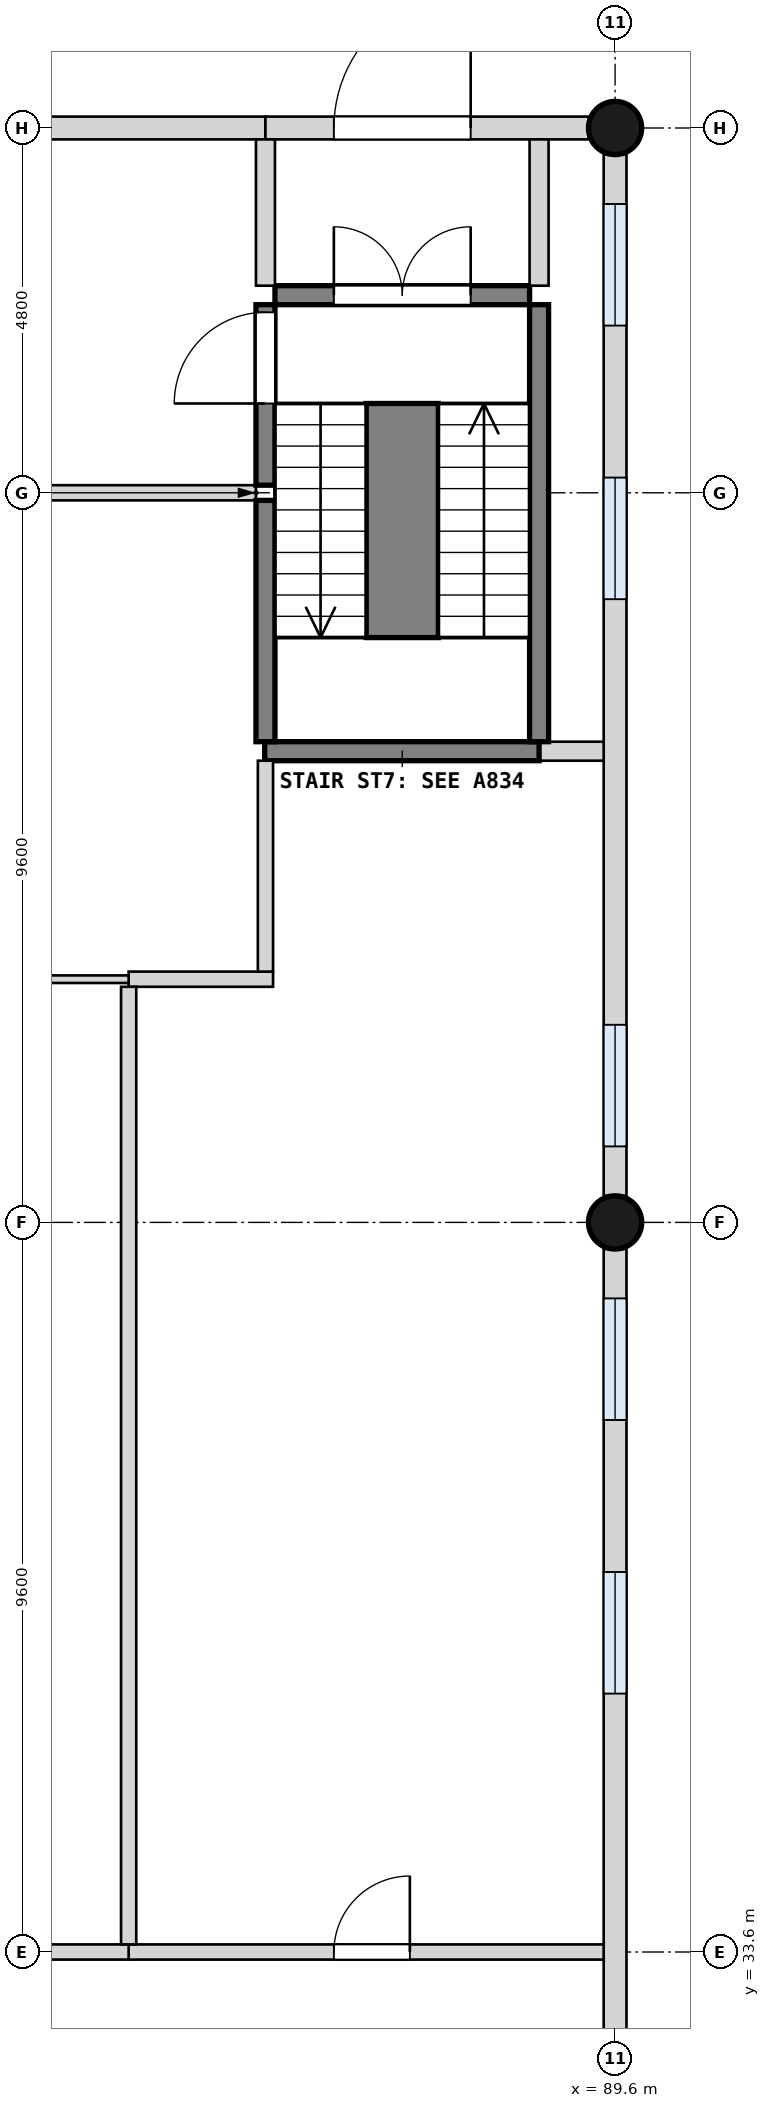
"""IFC4 building model, lengths in metres.
Left out: names, types, materials, properties, quantities, classifications, styles, units other than length and angle.
Written with IfcOpenShell. Run it as: python <this file> out.ifc"""

import sys

from ifc_helpers import new_model, si_unit, direction, frame, frame_2d, origin, origin_2d, place, context, subcontext, project, spatial, rectangle, circle, extrude, element, fill, save


model = new_model("IFC4")
c1 = context("Model", 3, precision=1e-05, world=origin(), true_north=direction((0.0, 1.0)))
c2 = subcontext(c1, "Body", "Model", "MODEL_VIEW")
j1 = project(units=[si_unit("LENGTHUNIT", "METRE"), si_unit("PLANEANGLEUNIT", "RADIAN")], contexts=[c1])
p1 = place(None, origin())
s1 = spatial("IfcSite", under=j1, at=p1, CompositionType="ELEMENT")
p2 = place(p1, origin())
s2 = spatial("IfcBuilding", under=s1, at=p2, CompositionType="ELEMENT")
p3 = place(p2, origin())
s3 = spatial("IfcBuildingStorey", under=s2, at=p3, CompositionType="ELEMENT", Elevation=0.0)
for number, where, z_axis, x_axis in (
    (1, (89.6, 43.2, 0.0), (0.0, 0.0, 1.0), (1.0, 0.0, 0.0)),
    (2, (89.6, 57.6, 0.0), (0.0, 0.0, 1.0), (1.0, 0.0, 0.0)),
):
    element("IfcColumn", number, at=place(p3, frame(where, z_axis=z_axis, x_axis=x_axis)), inside=s3, PredefinedType="COLUMN", context=c2, shape_type="SweptSolid", body=[
        extrude(circle(Radius=0.35, at=origin_2d()), origin(), (0.0, 0.0, 1.0), 4.2),
    ])
p4 = place(p3, frame((77.15, 57.6, 0.0), z_axis=(0.0, 0.0, 1.0), x_axis=(1.0, 0.0, 0.0)))
e3 = element("IfcWall", 3, at=p4, inside=s3, PredefinedType="SOLIDWALL", context=c2, shape_type="SweptSolid", body=[
    extrude(rectangle(XDim=7.85, YDim=0.3, at=frame_2d((3.925, 0.0))), origin(), (0.0, 0.0, 1.0), 3.0),
])
p5 = place(p4, frame((2.15, 0.0, 0.0)))
e4 = element("IfcOpeningElement", 4, at=p5, cuts=e3, PredefinedType="OPENING", context=c2, shape_type="SweptSolid", body=[
    extrude(rectangle(XDim=2.0, YDim=2.1, at=frame_2d((1.0, 1.05))), frame((0.0, 0.16, 0.0), z_axis=(0.0, -1.0, 0.0), x_axis=(1.0, 0.0, 0.0)), (0.0, 0.0, 1.0), 0.32),
])
p6 = place(p3, frame((85.0, 57.6, 0.0), z_axis=(0.0, 0.0, 1.0), x_axis=(1.0, 0.0, 0.0)))
e5 = element("IfcWall", 5, at=p6, inside=s3, PredefinedType="SOLIDWALL", context=c2, shape_type="SweptSolid", body=[
    extrude(rectangle(XDim=4.25, YDim=0.3, at=frame_2d((2.125, 0.0))), origin(), (0.0, 0.0, 1.0), 3.0),
])
p7 = place(p6, frame((0.9, 0.0, 0.0)))
e6 = element("IfcOpeningElement", 6, at=p7, cuts=e5, PredefinedType="OPENING", context=c2, shape_type="SweptSolid", body=[
    extrude(rectangle(XDim=1.8, YDim=2.1, at=frame_2d((0.9, 1.05))), frame((0.0, 0.16, 0.0), z_axis=(0.0, -1.0, 0.0), x_axis=(1.0, 0.0, 0.0)), (0.0, 0.0, 1.0), 0.32),
])
p8 = place(p3, frame((89.6, 29.15, 0.0), z_axis=(0.0, 0.0, 1.0), x_axis=(0.0, 1.0, 0.0)))
e7 = element("IfcWall", 7, at=p8, inside=s3, PredefinedType="SOLIDWALL", context=c2, shape_type="SweptSolid", body=[
    extrude(rectangle(XDim=13.7, YDim=0.3, at=frame_2d((6.85, 0.0))), origin(), (0.0, 0.0, 1.0), 3.0),
])
p9 = place(p8, frame((1.05, 0.0, 0.0)))
e8 = element("IfcOpeningElement", 8, at=p9, cuts=e7, PredefinedType="OPENING", context=c2, shape_type="SweptSolid", body=[
    extrude(rectangle(XDim=2.0, YDim=2.1, at=frame_2d((1.0, 1.05))), frame((0.0, 0.16, 0.0), z_axis=(0.0, -1.0, 0.0), x_axis=(1.0, 0.0, 0.0)), (0.0, 0.0, 1.0), 0.32),
])
p10 = place(p8, frame((7.85, 0.0, 0.3)))
e9 = element("IfcOpeningElement", 9, at=p10, cuts=e7, PredefinedType="OPENING", context=c2, shape_type="SweptSolid", body=[
    extrude(rectangle(XDim=1.6, YDim=2.4, at=frame_2d((0.8, 1.2))), frame((0.0, 0.16, 0.0), z_axis=(0.0, -1.0, 0.0), x_axis=(1.0, 0.0, 0.0)), (0.0, 0.0, 1.0), 0.32),
])
p11 = place(p8, frame((11.45, 0.0, 0.3)))
e10 = element("IfcOpeningElement", 10, at=p11, cuts=e7, PredefinedType="OPENING", context=c2, shape_type="SweptSolid", body=[
    extrude(rectangle(XDim=1.6, YDim=2.4, at=frame_2d((0.8, 1.2))), frame((0.0, 0.16, 0.0), z_axis=(0.0, -1.0, 0.0), x_axis=(1.0, 0.0, 0.0)), (0.0, 0.0, 1.0), 0.32),
])
p12 = place(p3, frame((89.6, 43.55, 0.0), z_axis=(0.0, 0.0, 1.0), x_axis=(0.0, 1.0, 0.0)))
e11 = element("IfcWall", 11, at=p12, inside=s3, PredefinedType="SOLIDWALL", context=c2, shape_type="SweptSolid", body=[
    extrude(rectangle(XDim=13.7, YDim=0.3, at=frame_2d((6.85, 0.0))), origin(), (0.0, 0.0, 1.0), 3.0),
])
p13 = place(p12, frame((0.65, 0.0, 0.3)))
e12 = element("IfcOpeningElement", 12, at=p13, cuts=e11, PredefinedType="OPENING", context=c2, shape_type="SweptSolid", body=[
    extrude(rectangle(XDim=1.6, YDim=2.4, at=frame_2d((0.8, 1.2))), frame((0.0, 0.16, 0.0), z_axis=(0.0, -1.0, 0.0), x_axis=(1.0, 0.0, 0.0)), (0.0, 0.0, 1.0), 0.32),
])
p14 = place(p12, frame((7.85, 0.0, 0.3)))
e13 = element("IfcOpeningElement", 13, at=p14, cuts=e11, PredefinedType="OPENING", context=c2, shape_type="SweptSolid", body=[
    extrude(rectangle(XDim=1.6, YDim=2.4, at=frame_2d((0.8, 1.2))), frame((0.0, 0.16, 0.0), z_axis=(0.0, -1.0, 0.0), x_axis=(1.0, 0.0, 0.0)), (0.0, 0.0, 1.0), 0.32),
])
p15 = place(p12, frame((11.45, 0.0, 0.3)))
e14 = element("IfcOpeningElement", 14, at=p15, cuts=e11, PredefinedType="OPENING", context=c2, shape_type="SweptSolid", body=[
    extrude(rectangle(XDim=1.6, YDim=2.4, at=frame_2d((0.8, 1.2))), frame((0.0, 0.16, 0.0), z_axis=(0.0, -1.0, 0.0), x_axis=(1.0, 0.0, 0.0)), (0.0, 0.0, 1.0), 0.32),
])
p16 = place(p3, frame((89.45, 33.6, 0.0), z_axis=(0.0, 0.0, 1.0), x_axis=(-1.0, 0.0, 0.0)))
e15 = element("IfcWall", 15, at=p16, inside=s3, PredefinedType="PARTITIONING", context=c2, shape_type="SweptSolid", body=[
    extrude(rectangle(XDim=6.25, YDim=0.2, at=frame_2d((3.125, 0.0))), origin(), (0.0, 0.0, 1.0), 3.9),
])
p17 = place(p16, frame((2.55, 0.0, 0.0)))
e16 = element("IfcOpeningElement", 16, at=p17, cuts=e15, PredefinedType="OPENING", context=c2, shape_type="SweptSolid", body=[
    extrude(rectangle(XDim=1.0, YDim=2.1, at=frame_2d((0.5, 1.05))), frame((0.0, 0.11, 0.0), z_axis=(0.0, -1.0, 0.0), x_axis=(1.0, 0.0, 0.0)), (0.0, 0.0, 1.0), 0.22),
])
p18 = place(p3, frame((83.2, 33.6, 0.0), z_axis=(0.0, 0.0, 1.0), x_axis=(-1.0, 0.0, 0.0)))
e17 = element("IfcWall", 17, at=p18, inside=s3, PredefinedType="PARTITIONING", context=c2, shape_type="SweptSolid", body=[
    extrude(rectangle(XDim=6.4, YDim=0.2, at=frame_2d((3.2, 0.0))), origin(), (0.0, 0.0, 1.0), 3.9),
])
p19 = place(p18, frame((2.65, 0.0, 0.0)))
e18 = element("IfcOpeningElement", 18, at=p19, cuts=e17, PredefinedType="OPENING", context=c2, shape_type="SweptSolid", body=[
    extrude(rectangle(XDim=1.1, YDim=2.1, at=frame_2d((0.55, 1.05))), frame((0.0, 0.11, 0.0), z_axis=(0.0, -1.0, 0.0), x_axis=(1.0, 0.0, 0.0)), (0.0, 0.0, 1.0), 0.22),
])
p20 = place(p3, frame((85.1, 46.4, 0.0), z_axis=(0.0, 0.0, 1.0), x_axis=(-1.0, 0.0, 0.0)))
e19 = element("IfcWall", 19, at=p20, inside=s3, PredefinedType="PARTITIONING", context=c2, shape_type="SweptSolid", body=[
    extrude(rectangle(XDim=1.9, YDim=0.2, at=frame_2d((0.95, 0.0))), origin(), (0.0, 0.0, 1.0), 3.9),
])
p21 = place(p3, frame((83.2, 46.4, 0.0), z_axis=(0.0, 0.0, 1.0), x_axis=(-1.0, 0.0, 0.0)))
e20 = element("IfcWall", 20, at=p21, inside=s3, PredefinedType="PARTITIONING", context=c2, shape_type="SweptSolid", body=[
    extrude(rectangle(XDim=6.4, YDim=0.1, at=frame_2d((3.2, 0.0))), origin(), (0.0, 0.0, 1.0), 3.9),
])
p22 = place(p3, frame((89.45, 49.4, 0.0), z_axis=(0.0, 0.0, 1.0), x_axis=(-1.0, 0.0, 0.0)))
e21 = element("IfcWall", 21, at=p22, inside=s3, PredefinedType="PARTITIONING", context=c2, shape_type="SweptSolid", body=[
    extrude(rectangle(XDim=0.85, YDim=0.25, at=frame_2d((0.425, 0.0))), origin(), (0.0, 0.0, 1.0), 3.9),
])
p23 = place(p3, frame((88.6, 49.4, 0.0), z_axis=(0.0, 0.0, 1.0), x_axis=(-1.0, 0.0, 0.0)))
e22 = element("IfcWall", 22, at=p23, inside=s3, PredefinedType="SHEAR", context=c2, shape_type="SweptSolid", body=[
    extrude(rectangle(XDim=3.61, YDim=0.25, at=frame_2d((1.805, 0.0))), origin(), (0.0, 0.0, 1.0), 3.9),
])
p24 = place(p3, frame((84.875, 52.8, 0.0), z_axis=(0.0, 0.0, 1.0), x_axis=(-1.0, 0.0, 0.0)))
e23 = element("IfcWall", 23, at=p24, inside=s3, PredefinedType="PARTITIONING", context=c2, shape_type="SweptSolid", body=[
    extrude(rectangle(XDim=8.075, YDim=0.2, at=frame_2d((4.038, 0.0))), origin(), (0.0, 0.0, 1.0), 3.9),
])
p25 = place(p24, frame((3.775, 0.0, 0.0)))
e24 = element("IfcOpeningElement", 24, at=p25, cuts=e23, PredefinedType="OPENING", context=c2, shape_type="SweptSolid", body=[
    extrude(rectangle(XDim=1.0, YDim=2.1, at=frame_2d((0.5, 1.05))), frame((0.0, 0.11, 0.0), z_axis=(0.0, -1.0, 0.0), x_axis=(1.0, 0.0, 0.0)), (0.0, 0.0, 1.0), 0.22),
])
p26 = place(p3, frame((88.475, 55.4, 0.0), z_axis=(0.0, 0.0, 1.0), x_axis=(-1.0, 0.0, 0.0)))
e25 = element("IfcWall", 25, at=p26, inside=s3, PredefinedType="SHEAR", context=c2, shape_type="SweptSolid", body=[
    extrude(rectangle(XDim=3.35, YDim=0.25, at=frame_2d((1.675, 0.0))), origin(), (0.0, 0.0, 1.0), 3.9),
])
p27 = place(p26, frame((0.775, 0.0, 0.0)))
e26 = element("IfcOpeningElement", 26, at=p27, cuts=e25, PredefinedType="OPENING", context=c2, shape_type="SweptSolid", body=[
    extrude(rectangle(XDim=1.8, YDim=2.1, at=frame_2d((0.9, 1.05))), frame((0.0, 0.135, 0.0), z_axis=(0.0, -1.0, 0.0), x_axis=(1.0, 0.0, 0.0)), (0.0, 0.0, 1.0), 0.27),
])
p28 = place(p3, frame((88.6, 49.525, 0.0), z_axis=(0.0, 0.0, 1.0), x_axis=(0.0, 1.0, 0.0)))
e27 = element("IfcWall", 27, at=p28, inside=s3, PredefinedType="SHEAR", context=c2, shape_type="SweptSolid", body=[
    extrude(rectangle(XDim=5.75, YDim=0.25, at=frame_2d((2.875, 0.0))), origin(), (0.0, 0.0, 1.0), 3.9),
])
p29 = place(p3, frame((88.6, 55.525, 0.0), z_axis=(0.0, 0.0, 1.0), x_axis=(0.0, 1.0, 0.0)))
e28 = element("IfcWall", 28, at=p29, inside=s3, PredefinedType="PARTITIONING", context=c2, shape_type="SweptSolid", body=[
    extrude(rectangle(XDim=1.925, YDim=0.25, at=frame_2d((0.962, 0.0))), origin(), (0.0, 0.0, 1.0), 3.9),
])
p30 = place(p3, frame((85.0, 46.5, 0.0), z_axis=(0.0, 0.0, 1.0), x_axis=(0.0, 1.0, 0.0)))
e29 = element("IfcWall", 29, at=p30, inside=s3, PredefinedType="PARTITIONING", context=c2, shape_type="SweptSolid", body=[
    extrude(rectangle(XDim=2.775, YDim=0.2, at=frame_2d((1.387, 0.0))), origin(), (0.0, 0.0, 1.0), 3.9),
])
p31 = place(p3, frame((85.0, 49.525, 0.0), z_axis=(0.0, 0.0, 1.0), x_axis=(0.0, 1.0, 0.0)))
e30 = element("IfcWall", 30, at=p31, inside=s3, PredefinedType="SHEAR", context=c2, shape_type="SweptSolid", body=[
    extrude(rectangle(XDim=3.175, YDim=0.25, at=frame_2d((1.587, 0.0))), origin(), (0.0, 0.0, 1.0), 3.9),
])
p32 = place(p3, frame((85.0, 52.9, 0.0), z_axis=(0.0, 0.0, 1.0), x_axis=(0.0, 1.0, 0.0)))
e31 = element("IfcWall", 31, at=p32, inside=s3, PredefinedType="SHEAR", context=c2, shape_type="SweptSolid", body=[
    extrude(rectangle(XDim=2.375, YDim=0.25, at=frame_2d((1.188, 0.0))), origin(), (0.0, 0.0, 1.0), 3.9),
])
p33 = place(p32, frame((1.075, 0.0, 0.0)))
e32 = element("IfcOpeningElement", 32, at=p33, cuts=e31, PredefinedType="OPENING", context=c2, shape_type="SweptSolid", body=[
    extrude(rectangle(XDim=1.2, YDim=2.1, at=frame_2d((0.6, 1.05))), frame((0.0, 0.135, 0.0), z_axis=(0.0, -1.0, 0.0), x_axis=(1.0, 0.0, 0.0)), (0.0, 0.0, 1.0), 0.27),
])
p34 = place(p3, frame((85.0, 55.525, 0.0), z_axis=(0.0, 0.0, 1.0), x_axis=(0.0, 1.0, 0.0)))
e33 = element("IfcWall", 33, at=p34, inside=s3, PredefinedType="PARTITIONING", context=c2, shape_type="SweptSolid", body=[
    extrude(rectangle(XDim=1.925, YDim=0.25, at=frame_2d((0.962, 0.0))), origin(), (0.0, 0.0, 1.0), 3.9),
])
p35 = place(p3, frame((83.2, 33.7, 0.0), z_axis=(0.0, 0.0, 1.0), x_axis=(0.0, 1.0, 0.0)))
e34 = element("IfcWall", 34, at=p35, inside=s3, PredefinedType="PARTITIONING", context=c2, shape_type="SweptSolid", body=[
    extrude(rectangle(XDim=12.6, YDim=0.2, at=frame_2d((6.3, 0.0))), origin(), (0.0, 0.0, 1.0), 3.0),
])
p36 = place(p3, frame((86.8, 53.975, 0.0), z_axis=(0.0, 0.0, 1.0), x_axis=(0.0, -1.0, 0.0)))
e35 = element("IfcWall", 35, at=p36, inside=s3, PredefinedType="SHEAR", context=c2, shape_type="SweptSolid", body=[
    extrude(rectangle(XDim=3.08, YDim=0.95, at=frame_2d((1.54, 0.0))), origin(), (0.0, 0.0, 1.0), 4.2),
])
p37 = place(p7, origin())
e36 = element("IfcDoor", 36, at=p37, inside=s3, OperationType="SINGLE_SWING_RIGHT", PredefinedType="DOOR", context=c2, shape_type="SweptSolid", body=[
    extrude(rectangle(XDim=1.8, YDim=2.1, at=frame_2d((0.9, 1.05))), frame((0.0, 0.025, 0.0), z_axis=(0.0, -1.0, 0.0), x_axis=(1.0, 0.0, 0.0)), (0.0, 0.0, 1.0), 0.05),
])
fill(e6, e36)
p38 = place(p17, frame((1.0, 0.0, 0.0), z_axis=(0.0, 0.0, 1.0), x_axis=(-1.0, 0.0, 0.0)))
e37 = element("IfcDoor", 37, at=p38, inside=s3, OperationType="SINGLE_SWING_RIGHT", PredefinedType="DOOR", context=c2, shape_type="SweptSolid", body=[
    extrude(rectangle(XDim=1.0, YDim=2.1, at=frame_2d((0.5, 1.05))), frame((0.0, 0.025, 0.0), z_axis=(0.0, -1.0, 0.0), x_axis=(1.0, 0.0, 0.0)), (0.0, 0.0, 1.0), 0.05),
])
fill(e16, e37)
p39 = place(p33, origin())
e38 = element("IfcDoor", 38, at=p39, inside=s3, OperationType="SINGLE_SWING_LEFT", PredefinedType="DOOR", context=c2, shape_type="SweptSolid", body=[
    extrude(rectangle(XDim=1.2, YDim=2.1, at=frame_2d((0.6, 1.05))), frame((0.0, 0.025, 0.0), z_axis=(0.0, -1.0, 0.0), x_axis=(1.0, 0.0, 0.0)), (0.0, 0.0, 1.0), 0.05),
])
fill(e32, e38)
p40 = place(p27, frame((1.8, 0.0, 0.0), z_axis=(0.0, 0.0, 1.0), x_axis=(-1.0, 0.0, 0.0)))
e39 = element("IfcDoor", 39, at=p40, inside=s3, OperationType="DOUBLE_DOOR_SINGLE_SWING", PredefinedType="DOOR", context=c2, shape_type="SweptSolid", body=[
    extrude(rectangle(XDim=1.8, YDim=2.1, at=frame_2d((0.9, 1.05))), frame((0.0, 0.025, 0.0), z_axis=(0.0, -1.0, 0.0), x_axis=(1.0, 0.0, 0.0)), (0.0, 0.0, 1.0), 0.05),
])
fill(e26, e39)
p41 = place(p10, origin())
e40 = element("IfcWindow", 40, at=p41, inside=s3, PartitioningType="SINGLE_PANEL", PredefinedType="WINDOW", context=c2, shape_type="SweptSolid", body=[
    extrude(rectangle(XDim=1.6, YDim=2.4, at=frame_2d((0.8, 1.2))), frame((0.0, 0.03, 0.0), z_axis=(0.0, -1.0, 0.0), x_axis=(1.0, 0.0, 0.0)), (0.0, 0.0, 1.0), 0.06),
])
fill(e9, e40)
p42 = place(p11, origin())
e41 = element("IfcWindow", 41, at=p42, inside=s3, PartitioningType="SINGLE_PANEL", PredefinedType="WINDOW", context=c2, shape_type="SweptSolid", body=[
    extrude(rectangle(XDim=1.6, YDim=2.4, at=frame_2d((0.8, 1.2))), frame((0.0, 0.03, 0.0), z_axis=(0.0, -1.0, 0.0), x_axis=(1.0, 0.0, 0.0)), (0.0, 0.0, 1.0), 0.06),
])
fill(e10, e41)
p43 = place(p13, origin())
e42 = element("IfcWindow", 42, at=p43, inside=s3, PartitioningType="SINGLE_PANEL", PredefinedType="WINDOW", context=c2, shape_type="SweptSolid", body=[
    extrude(rectangle(XDim=1.6, YDim=2.4, at=frame_2d((0.8, 1.2))), frame((0.0, 0.03, 0.0), z_axis=(0.0, -1.0, 0.0), x_axis=(1.0, 0.0, 0.0)), (0.0, 0.0, 1.0), 0.06),
])
fill(e12, e42)
p44 = place(p14, origin())
e43 = element("IfcWindow", 43, at=p44, inside=s3, PartitioningType="SINGLE_PANEL", PredefinedType="WINDOW", context=c2, shape_type="SweptSolid", body=[
    extrude(rectangle(XDim=1.6, YDim=2.4, at=frame_2d((0.8, 1.2))), frame((0.0, 0.03, 0.0), z_axis=(0.0, -1.0, 0.0), x_axis=(1.0, 0.0, 0.0)), (0.0, 0.0, 1.0), 0.06),
])
fill(e13, e43)
p45 = place(p15, origin())
e44 = element("IfcWindow", 44, at=p45, inside=s3, PartitioningType="SINGLE_PANEL", PredefinedType="WINDOW", context=c2, shape_type="SweptSolid", body=[
    extrude(rectangle(XDim=1.6, YDim=2.4, at=frame_2d((0.8, 1.2))), frame((0.0, 0.03, 0.0), z_axis=(0.0, -1.0, 0.0), x_axis=(1.0, 0.0, 0.0)), (0.0, 0.0, 1.0), 0.06),
])
fill(e14, e44)
save(model, sys.argv[1])
